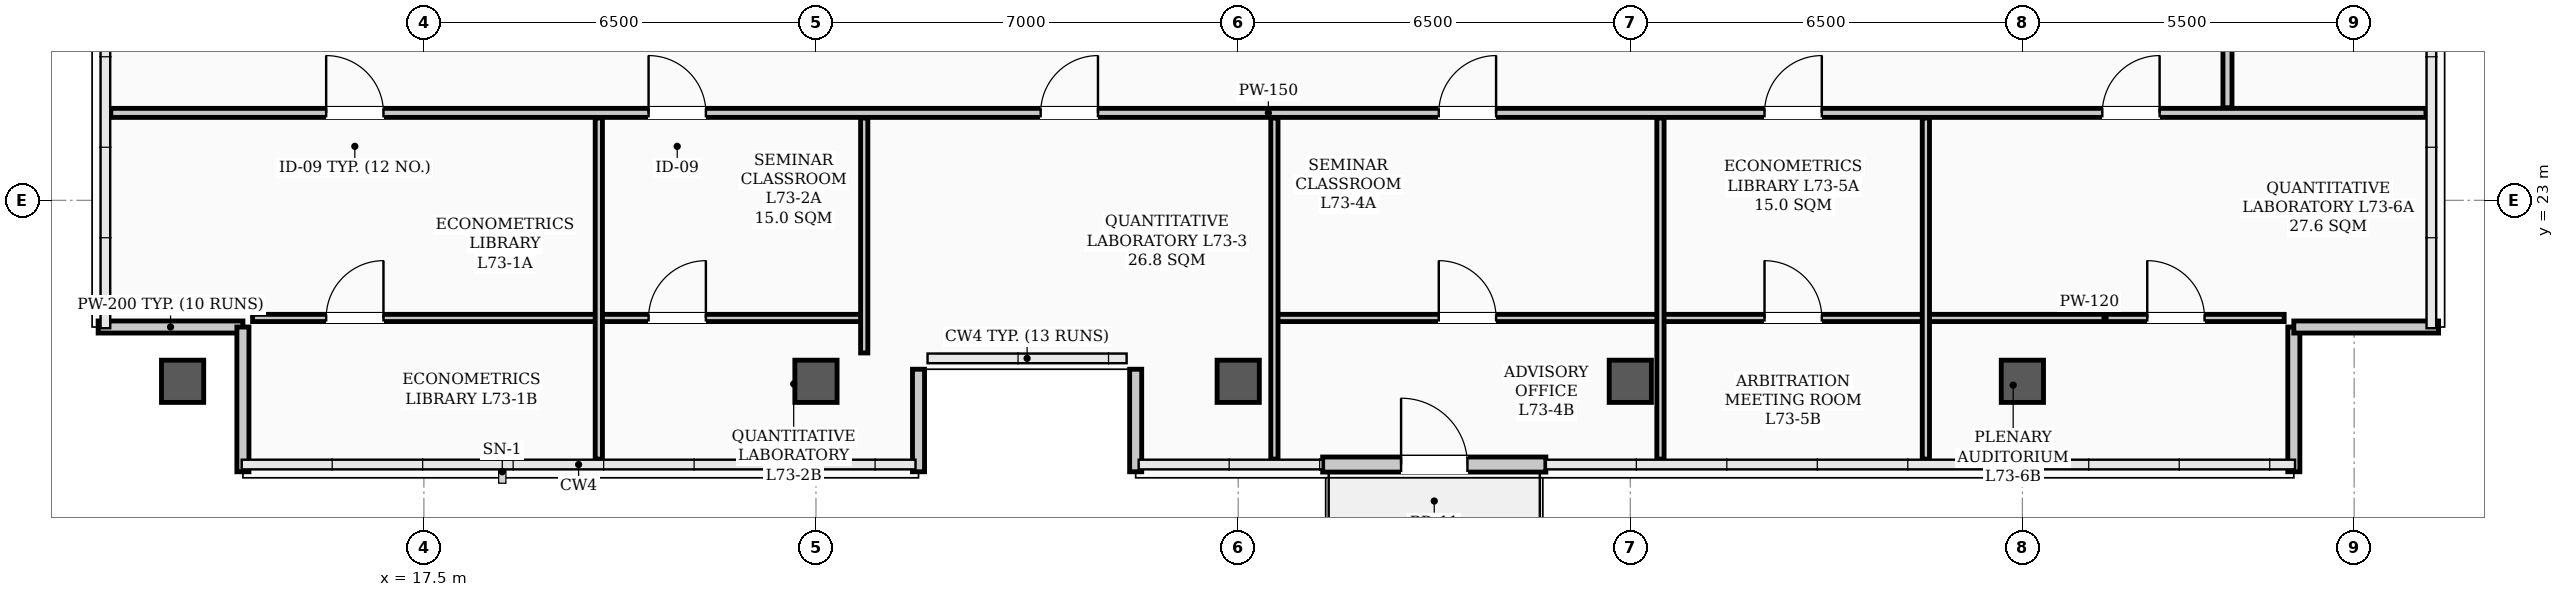
"""IFC4 building model, lengths in metres.
Left out: names, types, materials, properties, quantities, classifications, styles, units other than length and angle.
Written with IfcOpenShell. Run it as: python <this file> out.ifc"""

import sys

from ifc_helpers import new_model, si_unit, direction, frame, frame_2d, origin, origin_2d, place, context, subcontext, project, spatial, rectangle, hollow_rectangle, extrude, element, fill, save


model = new_model("IFC4")
c1 = context("Model", 3, precision=1e-05, world=origin(), true_north=direction((0.0, 1.0)))
c2 = subcontext(c1, "Body", "Model", "MODEL_VIEW")
j1 = project(units=[si_unit("LENGTHUNIT", "METRE"), si_unit("PLANEANGLEUNIT", "RADIAN")], contexts=[c1])
p1 = place(None, origin())
s1 = spatial("IfcSite", under=j1, at=p1, CompositionType="ELEMENT")
p2 = place(p1, origin())
s2 = spatial("IfcBuilding", under=s1, at=p2, CompositionType="ELEMENT")
p3 = place(p2, frame((0.0, 0.0, 293.0)))
s3 = spatial("IfcBuildingStorey", under=s2, at=p3, CompositionType="ELEMENT", Elevation=293.0)
for number, where, z_axis, x_axis in (
    (1, (13.5, 20.0, 0.0), (0.0, 0.0, 1.0), (1.0, 0.0, 0.0)),
    (2, (24.0, 20.0, 0.0), (0.0, 0.0, 1.0), (1.0, 0.0, 0.0)),
    (3, (31.0, 20.0, 0.0), (0.0, 0.0, 1.0), (1.0, 0.0, 0.0)),
    (4, (37.5, 20.0, 0.0), (0.0, 0.0, 1.0), (1.0, 0.0, 0.0)),
    (5, (44.0, 20.0, 0.0), (0.0, 0.0, 1.0), (1.0, 0.0, 0.0)),
):
    element("IfcColumn", number, at=place(p3, frame(where, z_axis=z_axis, x_axis=x_axis)), inside=s3, PredefinedType="COLUMN", context=c2, shape_type="SweptSolid", body=[
        extrude(hollow_rectangle(XDim=0.7, YDim=0.7, WallThickness=0.028, InnerFilletRadius=0.014, OuterFilletRadius=0.042, at=origin_2d()), origin(), (0.0, 0.0, 1.0), 3.9),
    ])
for number, where, z_axis, x_axis in (
    (6, (12.1, 20.9, 0.0), (0.0, 0.0, 1.0), (1.0, 0.0, 0.0)),
    (7, (14.5, 20.9, 0.0), (0.0, 0.0, 1.0), (0.0, -1.0, 0.0)),
    (8, (48.5, 18.5, 0.0), (0.0, 0.0, 1.0), (0.0, 1.0, 0.0)),
    (9, (48.5, 20.9, 0.0), (0.0, 0.0, 1.0), (1.0, 0.0, 0.0)),
):
    element("IfcWall", number, at=place(p3, frame(where, z_axis=z_axis, x_axis=x_axis)), inside=s3, PredefinedType="PARAPET", context=c2, shape_type="SweptSolid", body=[
        extrude(rectangle(XDim=2.4, YDim=0.2, at=frame_2d((1.2, 0.0))), origin(), (0.0, 0.0, 1.0), 1.2),
    ])
for number, where, z_axis, x_axis in (
    (10, (25.7, 18.5, 0.0), (0.0, 0.0, 1.0), (0.0, 1.0, 0.0)),
    (11, (29.3, 20.2, 0.0), (0.0, 0.0, 1.0), (0.0, -1.0, 0.0)),
):
    element("IfcWall", number, at=place(p3, frame(where, z_axis=z_axis, x_axis=x_axis)), inside=s3, PredefinedType="PARAPET", context=c2, shape_type="SweptSolid", body=[
        extrude(rectangle(XDim=1.7, YDim=0.2, at=frame_2d((0.85, 0.0))), origin(), (0.0, 0.0, 1.0), 1.2),
    ])
p4 = place(p3, frame((32.4, 18.62, 0.0), z_axis=(0.0, 0.0, 1.0), x_axis=(1.0, 0.0, 0.0)))
e12 = element("IfcWall", 12, at=p4, inside=s3, PredefinedType="STANDARD", context=c2, shape_type="SweptSolid", body=[
    extrude(rectangle(XDim=3.7, YDim=0.25, at=frame_2d((1.85, 0.0))), origin(), (0.0, 0.0, 1.0), 3.18),
])
p5 = place(p4, frame((1.3, 0.0, 0.0)))
e13 = element("IfcOpeningElement", 13, at=p5, cuts=e12, PredefinedType="OPENING", context=c2, shape_type="SweptSolid", body=[
    extrude(rectangle(XDim=1.1, YDim=2.2, at=frame_2d((0.55, 1.1))), frame((0.0, 0.135, 0.0), z_axis=(0.0, -1.0, 0.0), x_axis=(1.0, 0.0, 0.0)), (0.0, 0.0, 1.0), 0.27),
])
p6 = place(p3, frame((12.31, 24.45, 0.0), z_axis=(0.0, 0.0, 1.0), x_axis=(1.0, 0.0, 0.0)))
e14 = element("IfcWall", 14, at=p6, inside=s3, PredefinedType="PARTITIONING", context=c2, shape_type="SweptSolid", body=[
    extrude(rectangle(XDim=38.38, YDim=0.15, at=frame_2d((19.19, 0.0))), origin(), (0.0, 0.0, 1.0), 3.2),
])
p7 = place(p6, frame((3.57, 0.0, 0.0)))
e15 = element("IfcOpeningElement", 15, at=p7, cuts=e14, PredefinedType="OPENING", context=c2, shape_type="SweptSolid", body=[
    extrude(rectangle(XDim=0.95, YDim=2.08, at=frame_2d((0.475, 1.04))), frame((0.0, 0.085, 0.0), z_axis=(0.0, -1.0, 0.0), x_axis=(1.0, 0.0, 0.0)), (0.0, 0.0, 1.0), 0.17),
])
p8 = place(p6, frame((8.915, 0.0, 0.0)))
e16 = element("IfcOpeningElement", 16, at=p8, cuts=e14, PredefinedType="OPENING", context=c2, shape_type="SweptSolid", body=[
    extrude(rectangle(XDim=0.95, YDim=2.08, at=frame_2d((0.475, 1.04))), frame((0.0, 0.085, 0.0), z_axis=(0.0, -1.0, 0.0), x_axis=(1.0, 0.0, 0.0)), (0.0, 0.0, 1.0), 0.17),
])
p9 = place(p6, frame((15.415, 0.0, 0.0)))
e17 = element("IfcOpeningElement", 17, at=p9, cuts=e14, PredefinedType="OPENING", context=c2, shape_type="SweptSolid", body=[
    extrude(rectangle(XDim=0.95, YDim=2.08, at=frame_2d((0.475, 1.04))), frame((0.0, 0.085, 0.0), z_axis=(0.0, -1.0, 0.0), x_axis=(1.0, 0.0, 0.0)), (0.0, 0.0, 1.0), 0.17),
])
p10 = place(p6, frame((22.015, 0.0, 0.0)))
e18 = element("IfcOpeningElement", 18, at=p10, cuts=e14, PredefinedType="OPENING", context=c2, shape_type="SweptSolid", body=[
    extrude(rectangle(XDim=0.95, YDim=2.08, at=frame_2d((0.475, 1.04))), frame((0.0, 0.085, 0.0), z_axis=(0.0, -1.0, 0.0), x_axis=(1.0, 0.0, 0.0)), (0.0, 0.0, 1.0), 0.17),
])
p11 = place(p6, frame((27.415, 0.0, 0.0)))
e19 = element("IfcOpeningElement", 19, at=p11, cuts=e14, PredefinedType="OPENING", context=c2, shape_type="SweptSolid", body=[
    extrude(rectangle(XDim=0.95, YDim=2.08, at=frame_2d((0.475, 1.04))), frame((0.0, 0.085, 0.0), z_axis=(0.0, -1.0, 0.0), x_axis=(1.0, 0.0, 0.0)), (0.0, 0.0, 1.0), 0.17),
])
p12 = place(p6, frame((33.015, 0.0, 0.0)))
e20 = element("IfcOpeningElement", 20, at=p12, cuts=e14, PredefinedType="OPENING", context=c2, shape_type="SweptSolid", body=[
    extrude(rectangle(XDim=0.95, YDim=2.08, at=frame_2d((0.475, 1.04))), frame((0.0, 0.085, 0.0), z_axis=(0.0, -1.0, 0.0), x_axis=(1.0, 0.0, 0.0)), (0.0, 0.0, 1.0), 0.17),
])
p13 = place(p3, frame((14.66, 21.05, 0.0), z_axis=(0.0, 0.0, 1.0), x_axis=(1.0, 0.0, 0.0)))
e21 = element("IfcWall", 21, at=p13, inside=s3, PredefinedType="PARTITIONING", context=c2, shape_type="SweptSolid", body=[
    extrude(rectangle(XDim=5.74, YDim=0.12, at=frame_2d((2.87, 0.0))), origin(), (0.0, 0.0, 1.0), 3.72),
])
p14 = place(p13, frame((1.22, 0.0, 0.0)))
e22 = element("IfcOpeningElement", 22, at=p14, cuts=e21, PredefinedType="OPENING", context=c2, shape_type="SweptSolid", body=[
    extrude(rectangle(XDim=0.95, YDim=2.08, at=frame_2d((0.475, 1.04))), frame((0.0, 0.07, 0.0), z_axis=(0.0, -1.0, 0.0), x_axis=(1.0, 0.0, 0.0)), (0.0, 0.0, 1.0), 0.14),
])
p15 = place(p3, frame((20.4, 21.05, 0.0), z_axis=(0.0, 0.0, 1.0), x_axis=(1.0, 0.0, 0.0)))
e23 = element("IfcWall", 23, at=p15, inside=s3, PredefinedType="PARTITIONING", context=c2, shape_type="SweptSolid", body=[
    extrude(rectangle(XDim=4.4, YDim=0.12, at=frame_2d((2.2, 0.0))), origin(), (0.0, 0.0, 1.0), 3.2),
])
p16 = place(p15, frame((0.825, 0.0, 0.0)))
e24 = element("IfcOpeningElement", 24, at=p16, cuts=e23, PredefinedType="OPENING", context=c2, shape_type="SweptSolid", body=[
    extrude(rectangle(XDim=0.95, YDim=2.08, at=frame_2d((0.475, 1.04))), frame((0.0, 0.07, 0.0), z_axis=(0.0, -1.0, 0.0), x_axis=(1.0, 0.0, 0.0)), (0.0, 0.0, 1.0), 0.14),
])
p17 = place(p3, frame((31.6, 21.05, 0.0), z_axis=(0.0, 0.0, 1.0), x_axis=(1.0, 0.0, 0.0)))
e25 = element("IfcWall", 25, at=p17, inside=s3, PredefinedType="PARTITIONING", context=c2, shape_type="SweptSolid", body=[
    extrude(rectangle(XDim=6.4, YDim=0.12, at=frame_2d((3.2, 0.0))), origin(), (0.0, 0.0, 1.0), 3.2),
])
p18 = place(p17, frame((2.725, 0.0, 0.0)))
e26 = element("IfcOpeningElement", 26, at=p18, cuts=e25, PredefinedType="OPENING", context=c2, shape_type="SweptSolid", body=[
    extrude(rectangle(XDim=0.95, YDim=2.08, at=frame_2d((0.475, 1.04))), frame((0.0, 0.07, 0.0), z_axis=(0.0, -1.0, 0.0), x_axis=(1.0, 0.0, 0.0)), (0.0, 0.0, 1.0), 0.14),
])
p19 = place(p3, frame((38.0, 21.05, 0.0), z_axis=(0.0, 0.0, 1.0), x_axis=(1.0, 0.0, 0.0)))
e27 = element("IfcWall", 27, at=p19, inside=s3, PredefinedType="PARTITIONING", context=c2, shape_type="SweptSolid", body=[
    extrude(rectangle(XDim=4.4, YDim=0.12, at=frame_2d((2.2, 0.0))), origin(), (0.0, 0.0, 1.0), 3.2),
])
p20 = place(p19, frame((1.725, 0.0, 0.0)))
e28 = element("IfcOpeningElement", 28, at=p20, cuts=e27, PredefinedType="OPENING", context=c2, shape_type="SweptSolid", body=[
    extrude(rectangle(XDim=0.95, YDim=2.08, at=frame_2d((0.475, 1.04))), frame((0.0, 0.07, 0.0), z_axis=(0.0, -1.0, 0.0), x_axis=(1.0, 0.0, 0.0)), (0.0, 0.0, 1.0), 0.14),
])
p21 = place(p3, frame((42.4, 21.05, 0.0), z_axis=(0.0, 0.0, 1.0), x_axis=(1.0, 0.0, 0.0)))
e29 = element("IfcWall", 29, at=p21, inside=s3, PredefinedType="PARTITIONING", context=c2, shape_type="SweptSolid", body=[
    extrude(rectangle(XDim=5.94, YDim=0.12, at=frame_2d((2.97, 0.0))), origin(), (0.0, 0.0, 1.0), 3.2),
])
p22 = place(p21, frame((3.67, 0.0, 0.0)))
e30 = element("IfcOpeningElement", 30, at=p22, cuts=e29, PredefinedType="OPENING", context=c2, shape_type="SweptSolid", body=[
    extrude(rectangle(XDim=0.95, YDim=2.08, at=frame_2d((0.475, 1.04))), frame((0.0, 0.07, 0.0), z_axis=(0.0, -1.0, 0.0), x_axis=(1.0, 0.0, 0.0)), (0.0, 0.0, 1.0), 0.14),
])
p23 = place(p3, frame((47.4, 24.535, 0.0), z_axis=(0.0, 0.0, 1.0), x_axis=(0.0, 1.0, 0.0)))
e31 = element("IfcWall", 31, at=p23, inside=s3, PredefinedType="PARTITIONING", context=c2, shape_type="SweptSolid", body=[
    extrude(rectangle(XDim=17.13, YDim=0.15, at=frame_2d((8.565, 0.0))), origin(), (0.0, 0.0, 1.0), 3.1),
])
p24 = place(p23, frame((8.09, 0.0, 0.0)))
e32 = element("IfcOpeningElement", 32, at=p24, cuts=e31, PredefinedType="OPENING", context=c2, shape_type="SweptSolid", body=[
    extrude(rectangle(XDim=0.95, YDim=2.08, at=frame_2d((0.475, 1.04))), frame((0.0, 0.085, 0.0), z_axis=(0.0, -1.0, 0.0), x_axis=(1.0, 0.0, 0.0)), (0.0, 0.0, 1.0), 0.17),
])
p25 = place(p3, frame((20.4, 18.71, 0.0), z_axis=(0.0, 0.0, 1.0), x_axis=(0.0, 1.0, 0.0)))
e33 = element("IfcWall", 33, at=p25, inside=s3, PredefinedType="PARTITIONING", context=c2, shape_type="SweptSolid", body=[
    extrude(rectangle(XDim=5.655, YDim=0.12, at=frame_2d((2.828, 0.0))), origin(), (0.0, 0.0, 1.0), 3.72),
])
p26 = place(p3, frame((24.8, 20.47, 0.0), z_axis=(0.0, 0.0, 1.0), x_axis=(0.0, 1.0, 0.0)))
e34 = element("IfcWall", 34, at=p26, inside=s3, PredefinedType="PARTITIONING", context=c2, shape_type="SweptSolid", body=[
    extrude(rectangle(XDim=3.895, YDim=0.12, at=frame_2d((1.948, 0.0))), origin(), (0.0, 0.0, 1.0), 3.1),
])
for number, where, z_axis, x_axis in (
    (35, (31.6, 18.71, 0.0), (0.0, 0.0, 1.0), (0.0, 1.0, 0.0)),
    (36, (38.0, 18.71, 0.0), (0.0, 0.0, 1.0), (0.0, 1.0, 0.0)),
    (37, (42.4, 18.71, 0.0), (0.0, 0.0, 1.0), (0.0, 1.0, 0.0)),
):
    element("IfcWall", number, at=place(p3, frame(where, z_axis=z_axis, x_axis=x_axis)), inside=s3, PredefinedType="PARTITIONING", context=c2, shape_type="SweptSolid", body=[
        extrude(rectangle(XDim=5.655, YDim=0.12, at=frame_2d((2.828, 0.0))), origin(), (0.0, 0.0, 1.0), 3.1),
    ])
p27 = place(p5, origin())
e38 = element("IfcDoor", 38, at=p27, inside=s3, OperationType="SINGLE_SWING_LEFT", PredefinedType="DOOR", context=c2, shape_type="SweptSolid", body=[
    extrude(rectangle(XDim=1.1, YDim=2.2, at=frame_2d((0.55, 1.1))), frame((0.0, 0.025, 0.0), z_axis=(0.0, -1.0, 0.0), x_axis=(1.0, 0.0, 0.0)), (0.0, 0.0, 1.0), 0.05),
])
fill(e13, e38)
p28 = place(p14, origin())
e39 = element("IfcDoor", 39, at=p28, inside=s3, OperationType="SINGLE_SWING_RIGHT", PredefinedType="DOOR", context=c2, shape_type="SweptSolid", body=[
    extrude(rectangle(XDim=0.95, YDim=2.08, at=frame_2d((0.475, 1.04))), frame((0.0, 0.025, 0.0), z_axis=(0.0, -1.0, 0.0), x_axis=(1.0, 0.0, 0.0)), (0.0, 0.0, 1.0), 0.05),
])
fill(e22, e39)
p29 = place(p7, origin())
e40 = element("IfcDoor", 40, at=p29, inside=s3, OperationType="SINGLE_SWING_LEFT", PredefinedType="DOOR", context=c2, shape_type="SweptSolid", body=[
    extrude(rectangle(XDim=0.95, YDim=2.08, at=frame_2d((0.475, 1.04))), frame((0.0, 0.025, 0.0), z_axis=(0.0, -1.0, 0.0), x_axis=(1.0, 0.0, 0.0)), (0.0, 0.0, 1.0), 0.05),
])
fill(e15, e40)
p30 = place(p16, origin())
e41 = element("IfcDoor", 41, at=p30, inside=s3, OperationType="SINGLE_SWING_RIGHT", PredefinedType="DOOR", context=c2, shape_type="SweptSolid", body=[
    extrude(rectangle(XDim=0.95, YDim=2.08, at=frame_2d((0.475, 1.04))), frame((0.0, 0.025, 0.0), z_axis=(0.0, -1.0, 0.0), x_axis=(1.0, 0.0, 0.0)), (0.0, 0.0, 1.0), 0.05),
])
fill(e24, e41)
p31 = place(p8, origin())
e42 = element("IfcDoor", 42, at=p31, inside=s3, OperationType="SINGLE_SWING_LEFT", PredefinedType="DOOR", context=c2, shape_type="SweptSolid", body=[
    extrude(rectangle(XDim=0.95, YDim=2.08, at=frame_2d((0.475, 1.04))), frame((0.0, 0.025, 0.0), z_axis=(0.0, -1.0, 0.0), x_axis=(1.0, 0.0, 0.0)), (0.0, 0.0, 1.0), 0.05),
])
fill(e16, e42)
p32 = place(p9, origin())
e43 = element("IfcDoor", 43, at=p32, inside=s3, OperationType="SINGLE_SWING_RIGHT", PredefinedType="DOOR", context=c2, shape_type="SweptSolid", body=[
    extrude(rectangle(XDim=0.95, YDim=2.08, at=frame_2d((0.475, 1.04))), frame((0.0, 0.025, 0.0), z_axis=(0.0, -1.0, 0.0), x_axis=(1.0, 0.0, 0.0)), (0.0, 0.0, 1.0), 0.05),
])
fill(e17, e43)
p33 = place(p18, origin())
e44 = element("IfcDoor", 44, at=p33, inside=s3, OperationType="SINGLE_SWING_LEFT", PredefinedType="DOOR", context=c2, shape_type="SweptSolid", body=[
    extrude(rectangle(XDim=0.95, YDim=2.08, at=frame_2d((0.475, 1.04))), frame((0.0, 0.025, 0.0), z_axis=(0.0, -1.0, 0.0), x_axis=(1.0, 0.0, 0.0)), (0.0, 0.0, 1.0), 0.05),
])
fill(e26, e44)
p34 = place(p10, origin())
e45 = element("IfcDoor", 45, at=p34, inside=s3, OperationType="SINGLE_SWING_RIGHT", PredefinedType="DOOR", context=c2, shape_type="SweptSolid", body=[
    extrude(rectangle(XDim=0.95, YDim=2.08, at=frame_2d((0.475, 1.04))), frame((0.0, 0.025, 0.0), z_axis=(0.0, -1.0, 0.0), x_axis=(1.0, 0.0, 0.0)), (0.0, 0.0, 1.0), 0.05),
])
fill(e18, e45)
p35 = place(p20, origin())
e46 = element("IfcDoor", 46, at=p35, inside=s3, OperationType="SINGLE_SWING_LEFT", PredefinedType="DOOR", context=c2, shape_type="SweptSolid", body=[
    extrude(rectangle(XDim=0.95, YDim=2.08, at=frame_2d((0.475, 1.04))), frame((0.0, 0.025, 0.0), z_axis=(0.0, -1.0, 0.0), x_axis=(1.0, 0.0, 0.0)), (0.0, 0.0, 1.0), 0.05),
])
fill(e28, e46)
p36 = place(p11, origin())
e47 = element("IfcDoor", 47, at=p36, inside=s3, OperationType="SINGLE_SWING_RIGHT", PredefinedType="DOOR", context=c2, shape_type="SweptSolid", body=[
    extrude(rectangle(XDim=0.95, YDim=2.08, at=frame_2d((0.475, 1.04))), frame((0.0, 0.025, 0.0), z_axis=(0.0, -1.0, 0.0), x_axis=(1.0, 0.0, 0.0)), (0.0, 0.0, 1.0), 0.05),
])
fill(e19, e47)
p37 = place(p22, origin())
e48 = element("IfcDoor", 48, at=p37, inside=s3, OperationType="SINGLE_SWING_LEFT", PredefinedType="DOOR", context=c2, shape_type="SweptSolid", body=[
    extrude(rectangle(XDim=0.95, YDim=2.08, at=frame_2d((0.475, 1.04))), frame((0.0, 0.025, 0.0), z_axis=(0.0, -1.0, 0.0), x_axis=(1.0, 0.0, 0.0)), (0.0, 0.0, 1.0), 0.05),
])
fill(e30, e48)
p38 = place(p12, origin())
e49 = element("IfcDoor", 49, at=p38, inside=s3, OperationType="SINGLE_SWING_RIGHT", PredefinedType="DOOR", context=c2, shape_type="SweptSolid", body=[
    extrude(rectangle(XDim=0.95, YDim=2.08, at=frame_2d((0.475, 1.04))), frame((0.0, 0.025, 0.0), z_axis=(0.0, -1.0, 0.0), x_axis=(1.0, 0.0, 0.0)), (0.0, 0.0, 1.0), 0.05),
])
fill(e20, e49)
save(model, sys.argv[1])
